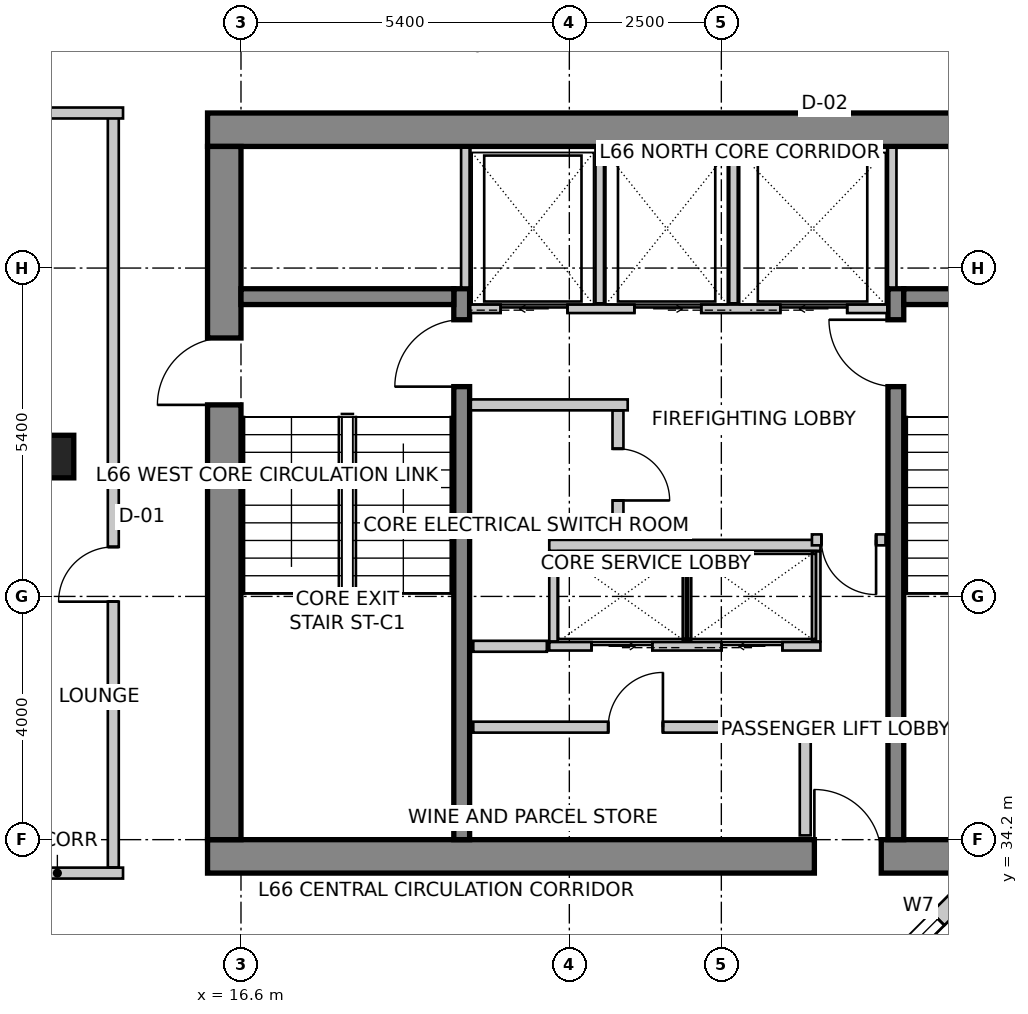
"""IFC4 building model, lengths in metres.
Left out: names, types, materials, properties, quantities, classifications, styles, units other than length and angle.
Written with IfcOpenShell. Run it as: python <this file> out.ifc"""

import sys

from ifc_helpers import new_model, si_unit, direction, frame, frame_2d, origin, origin_2d, place, context, subcontext, project, spatial, rectangle, extrude, source, transform, mapped, element, fill, save


model = new_model("IFC4")
c1 = context("Model", 3, precision=1e-05, world=origin(), true_north=direction((0.0, 1.0)))
c2 = subcontext(c1, "Body", "Model", "MODEL_VIEW")
j1 = project(units=[si_unit("LENGTHUNIT", "METRE"), si_unit("PLANEANGLEUNIT", "RADIAN")], contexts=[c1])
p1 = place(None, origin())
s1 = spatial("IfcSite", under=j1, at=p1, CompositionType="ELEMENT")
p2 = place(p1, origin())
s2 = spatial("IfcBuilding", under=s1, at=p2, CompositionType="ELEMENT")
p3 = place(p2, frame((0.0, 0.0, 260.1)))
s3 = spatial("IfcBuildingStorey", under=s2, at=p3, CompositionType="ELEMENT", Elevation=260.1)
p4 = place(p3, frame((16.05, 45.875, 0.0), z_axis=(0.0, 0.0, 1.0), x_axis=(1.0, 0.0, 0.0)))
e1 = element("IfcWall", 1, at=p4, inside=s3, PredefinedType="SHEAR", context=c2, shape_type="SweptSolid", body=[
    extrude(rectangle(XDim=15.5, YDim=0.55, at=frame_2d((7.75, 0.0))), origin(), (0.0, 0.0, 1.0), 3.6),
])
p5 = place(p3, frame((16.05, 33.925, 0.0), z_axis=(0.0, 0.0, 1.0), x_axis=(1.0, 0.0, 0.0)))
e2 = element("IfcWall", 2, at=p5, inside=s3, PredefinedType="SHEAR", context=c2, shape_type="SweptSolid", body=[
    extrude(rectangle(XDim=15.5, YDim=0.55, at=frame_2d((7.75, 0.0))), origin(), (0.0, 0.0, 1.0), 3.6),
])
m1 = source(origin(), c2, "Body", "SweptSolid", [
    extrude(rectangle(XDim=1.1, YDim=2.15, at=frame_2d((0.55, 1.075))), frame((0.0, 0.285, 0.0), z_axis=(0.0, -1.0, 0.0), x_axis=(1.0, 0.0, 0.0)), (0.0, 0.0, 1.0), 0.57),
])
p6 = place(p5, frame((9.98, 0.0, 0.0)))
e3 = element("IfcOpeningElement", 3, at=p6, cuts=e2, PredefinedType="OPENING", context=c2, shape_type="MappedRepresentation", body=[
    mapped(m1, transform((0.0, 0.0, 0.0), scale=1.0)),
])
p7 = place(p3, frame((16.325, 34.2, 0.0), z_axis=(0.0, 0.0, 1.0), x_axis=(0.0, 1.0, 0.0)))
e4 = element("IfcWall", 4, at=p7, inside=s3, PredefinedType="SHEAR", context=c2, shape_type="SweptSolid", body=[
    extrude(rectangle(XDim=11.4, YDim=0.55, at=frame_2d((5.7, 0.0))), origin(), (0.0, 0.0, 1.0), 3.6),
])
p8 = place(p7, frame((7.15, 0.0, 0.0)))
e5 = element("IfcOpeningElement", 5, at=p8, cuts=e4, PredefinedType="OPENING", context=c2, shape_type="MappedRepresentation", body=[
    mapped(m1, transform((0.0, 0.0, 0.0), scale=1.0)),
])
p9 = place(p3, frame((20.23, 34.2, 0.0), z_axis=(0.0, 0.0, 1.0), x_axis=(0.0, 1.0, 0.0)))
e6 = element("IfcWall", 6, at=p9, inside=s3, PredefinedType="SHEAR", context=c2, shape_type="SweptSolid", body=[
    extrude(rectangle(XDim=9.06, YDim=0.26, at=frame_2d((4.53, 0.0))), origin(), (0.0, 0.0, 1.0), 3.6),
])
m2 = source(origin(), c2, "Body", "SweptSolid", [
    extrude(rectangle(XDim=1.1, YDim=2.15, at=frame_2d((0.55, 1.075))), frame((0.0, 0.14, 0.0), z_axis=(0.0, -1.0, 0.0), x_axis=(1.0, 0.0, 0.0)), (0.0, 0.0, 1.0), 0.28),
])
p10 = place(p9, frame((7.45, 0.0, 0.0)))
e7 = element("IfcOpeningElement", 7, at=p10, cuts=e6, PredefinedType="OPENING", context=c2, shape_type="MappedRepresentation", body=[
    mapped(m2, transform((0.0, 0.0, 0.0), scale=1.0)),
])
p11 = place(p3, frame((27.37, 34.2, 0.0), z_axis=(0.0, 0.0, 1.0), x_axis=(0.0, 1.0, 0.0)))
e8 = element("IfcWall", 8, at=p11, inside=s3, PredefinedType="SHEAR", context=c2, shape_type="SweptSolid", body=[
    extrude(rectangle(XDim=9.06, YDim=0.26, at=frame_2d((4.53, 0.0))), origin(), (0.0, 0.0, 1.0), 3.6),
])
p12 = place(p11, frame((7.45, 0.0, 0.0)))
e9 = element("IfcOpeningElement", 9, at=p12, cuts=e8, PredefinedType="OPENING", context=c2, shape_type="MappedRepresentation", body=[
    mapped(m2, transform((0.0, 0.0, 0.0), scale=1.0)),
])
for number, where, z_axis, x_axis in (
    (10, (16.6, 43.13, 0.0), (0.0, 0.0, 1.0), (1.0, 0.0, 0.0)),
    (11, (27.5, 43.13, 0.0), (0.0, 0.0, 1.0), (1.0, 0.0, 0.0)),
):
    element("IfcWall", number, at=place(p3, frame(where, z_axis=z_axis, x_axis=x_axis)), inside=s3, PredefinedType="SHEAR", context=c2, shape_type="SweptSolid", body=[
        extrude(rectangle(XDim=3.5, YDim=0.26, at=frame_2d((1.75, 0.0))), origin(), (0.0, 0.0, 1.0), 3.6),
    ])
m3 = source(origin(), c2, "Body", "SweptSolid", [
    extrude(rectangle(XDim=0.7, YDim=0.7, at=origin_2d()), origin(), (0.0, 0.0, 1.0), 3.6),
])
p13 = place(p3, frame((13.5, 40.5, 0.0), z_axis=(0.0, 0.0, 1.0), x_axis=(1.0, 0.0, 0.0)))
e12 = element("IfcColumn", 12, at=p13, inside=s3, PredefinedType="COLUMN", context=c2, shape_type="MappedRepresentation", body=[
    mapped(m3, transform((0.0, 0.0, 0.0), scale=1.0)),
])
p14 = place(p3, frame((26.42, 31.256, 0.0), z_axis=(0.0, 0.0, 1.0), x_axis=(0.707106781187, 0.707106781187, 0.0)))
e13 = element("IfcWall", 13, at=p14, inside=s3, PredefinedType="SOLIDWALL", context=c2, shape_type="SweptSolid", body=[
    extrude(rectangle(XDim=2.907, YDim=0.3, at=frame_2d((1.454, 0.0))), origin(), (0.0, 0.0, 1.0), 3.35),
])
m4 = source(origin(), c2, "Body", "SweptSolid", [
    extrude(rectangle(XDim=0.9, YDim=1.6, at=frame_2d((0.45, 0.8))), frame((0.0, 0.16, 0.0), z_axis=(0.0, -1.0, 0.0), x_axis=(1.0, 0.0, 0.0)), (0.0, 0.0, 1.0), 0.32),
])
p15 = place(p14, frame((1.422, 0.0, 0.85)))
e14 = element("IfcOpeningElement", 14, at=p15, cuts=e13, PredefinedType="OPENING", context=c2, shape_type="MappedRepresentation", body=[
    mapped(m4, transform((0.0, 0.0, 0.0), scale=1.0)),
])
p16 = place(p3, frame((21.874, 52.742, 0.0), z_axis=(0.0, 0.0, 1.0), x_axis=(-0.84365659959, -0.536883173482, 0.0)))
e15 = element("IfcWall", 15, at=p16, inside=s3, PredefinedType="SOLIDWALL", context=c2, shape_type="SweptSolid", body=[
    extrude(rectangle(XDim=10.283, YDim=0.3, at=frame_2d((5.142, 0.0))), origin(), (0.0, 0.0, 1.0), 3.35),
])
m5 = source(origin(), c2, "Body", "SweptSolid", [
    extrude(rectangle(XDim=2.1, YDim=2.0, at=frame_2d((1.05, 1.0))), frame((0.0, 0.16, 0.0), z_axis=(0.0, -1.0, 0.0), x_axis=(1.0, 0.0, 0.0)), (0.0, 0.0, 1.0), 0.32),
])
p17 = place(p16, frame((1.41, 0.0, 0.85)))
e16 = element("IfcOpeningElement", 16, at=p17, cuts=e15, PredefinedType="OPENING", context=c2, shape_type="MappedRepresentation", body=[
    mapped(m5, transform((0.0, 0.0, 0.0), scale=1.0)),
])
m6 = source(origin(), c2, "Body", "SweptSolid", [
    extrude(rectangle(XDim=2.4, YDim=2.2, at=frame_2d((1.2, 1.1))), frame((0.0, 0.16, 0.0), z_axis=(0.0, -1.0, 0.0), x_axis=(1.0, 0.0, 0.0)), (0.0, 0.0, 1.0), 0.32),
])
p18 = place(p16, frame((5.54, 0.0, 0.85)))
e17 = element("IfcOpeningElement", 17, at=p18, cuts=e15, PredefinedType="OPENING", context=c2, shape_type="MappedRepresentation", body=[
    mapped(m6, transform((0.0, 0.0, 0.0), scale=1.0)),
])
p19 = place(p3, frame((20.37, 42.93, 0.0), z_axis=(0.0, 0.0, 1.0), x_axis=(1.0, 0.0, 0.0)))
e18 = element("IfcWall", 18, at=p19, inside=s3, PredefinedType="SOLIDWALL", context=c2, shape_type="SweptSolid", body=[
    extrude(rectangle(XDim=6.86, YDim=0.14, at=frame_2d((3.43, 0.0))), origin(), (0.0, 0.0, 1.0), 3.35),
])
m7 = source(origin(), c2, "Body", "SweptSolid", [
    extrude(rectangle(XDim=1.1, YDim=2.15, at=frame_2d((0.55, 1.075))), frame((0.0, 0.08, 0.0), z_axis=(0.0, -1.0, 0.0), x_axis=(1.0, 0.0, 0.0)), (0.0, 0.0, 1.0), 0.16),
])
p20 = place(p19, frame((0.5, 0.0, 0.0)))
e19 = element("IfcOpeningElement", 19, at=p20, cuts=e18, PredefinedType="OPENING", context=c2, shape_type="MappedRepresentation", body=[
    mapped(m7, transform((0.0, 0.0, 0.0), scale=1.0)),
])
p21 = place(p19, frame((2.7, 0.0, 0.0)))
e20 = element("IfcOpeningElement", 20, at=p21, cuts=e18, PredefinedType="OPENING", context=c2, shape_type="MappedRepresentation", body=[
    mapped(m7, transform((0.0, 0.0, 0.0), scale=1.0)),
])
p22 = place(p19, frame((5.1, 0.0, 0.0)))
e21 = element("IfcOpeningElement", 21, at=p22, cuts=e18, PredefinedType="OPENING", context=c2, shape_type="MappedRepresentation", body=[
    mapped(m7, transform((0.0, 0.0, 0.0), scale=1.0)),
])
for number, where, z_axis, x_axis in (
    (22, (20.29, 43.28, 0.0), (0.0, 0.0, 1.0), (0.0, 1.0, 0.0)),
    (23, (27.31, 43.28, 0.0), (0.0, 0.0, 1.0), (0.0, 1.0, 0.0)),
):
    element("IfcWall", number, at=place(p3, frame(where, z_axis=z_axis, x_axis=x_axis)), inside=s3, PredefinedType="SOLIDWALL", context=c2, shape_type="SweptSolid", body=[
        extrude(rectangle(XDim=2.3, YDim=0.14, at=frame_2d((1.15, 0.0))), origin(), (0.0, 0.0, 1.0), 3.35),
    ])
for number, where, z_axis, x_axis in (
    (24, (22.5, 43.02, 0.0), (0.0, 0.0, 1.0), (0.0, 1.0, 0.0)),
    (25, (24.7, 43.02, 0.0), (0.0, 0.0, 1.0), (0.0, 1.0, 0.0)),
):
    element("IfcWall", number, at=place(p3, frame(where, z_axis=z_axis, x_axis=x_axis)), inside=s3, PredefinedType="SOLIDWALL", context=c2, shape_type="SweptSolid", body=[
        extrude(rectangle(XDim=2.56, YDim=0.14, at=frame_2d((1.28, 0.0))), origin(), (0.0, 0.0, 1.0), 3.35),
    ])
p23 = place(p3, frame((21.67, 37.38, 0.0), z_axis=(0.0, 0.0, 1.0), x_axis=(1.0, 0.0, 0.0)))
e26 = element("IfcWall", 26, at=p23, inside=s3, PredefinedType="SOLIDWALL", context=c2, shape_type="SweptSolid", body=[
    extrude(rectangle(XDim=4.46, YDim=0.14, at=frame_2d((2.23, 0.0))), origin(), (0.0, 0.0, 1.0), 3.35),
])
m8 = source(origin(), c2, "Body", "SweptSolid", [
    extrude(rectangle(XDim=1.0, YDim=2.15, at=frame_2d((0.5, 1.075))), frame((0.0, 0.08, 0.0), z_axis=(0.0, -1.0, 0.0), x_axis=(1.0, 0.0, 0.0)), (0.0, 0.0, 1.0), 0.16),
])
p24 = place(p23, frame((0.695, 0.0, 0.0)))
e27 = element("IfcOpeningElement", 27, at=p24, cuts=e26, PredefinedType="OPENING", context=c2, shape_type="MappedRepresentation", body=[
    mapped(m8, transform((0.0, 0.0, 0.0), scale=1.0)),
])
p25 = place(p23, frame((2.835, 0.0, 0.0)))
e28 = element("IfcOpeningElement", 28, at=p25, cuts=e26, PredefinedType="OPENING", context=c2, shape_type="MappedRepresentation", body=[
    mapped(m8, transform((0.0, 0.0, 0.0), scale=1.0)),
])
p26 = place(p3, frame((21.67, 39.04, 0.0), z_axis=(0.0, 0.0, 1.0), x_axis=(1.0, 0.0, 0.0)))
e29 = element("IfcWall", 29, at=p26, inside=s3, PredefinedType="SOLIDWALL", context=c2, shape_type="SweptSolid", body=[
    extrude(rectangle(XDim=4.46, YDim=0.18, at=frame_2d((2.23, 0.0))), origin(), (0.0, 0.0, 1.0), 3.35),
])
for number, where, z_axis, x_axis in (
    (30, (26.06, 37.46, 0.0), (0.0, 0.0, 1.0), (0.0, 1.0, 0.0)),
    (31, (21.74, 37.46, 0.0), (0.0, 0.0, 1.0), (0.0, 1.0, 0.0)),
    (32, (23.935, 37.46, 0.0), (0.0, 0.0, 1.0), (0.0, 1.0, 0.0)),
):
    element("IfcWall", number, at=place(p3, frame(where, z_axis=z_axis, x_axis=x_axis)), inside=s3, PredefinedType="SOLIDWALL", context=c2, shape_type="SweptSolid", body=[
        extrude(rectangle(XDim=1.48, YDim=0.14, at=frame_2d((0.74, 0.0))), origin(), (0.0, 0.0, 1.0), 3.35),
    ])
p27 = place(p3, frame((22.96, 41.35, 0.0), z_axis=(0.0, 0.0, 1.0), x_axis=(-1.0, 0.0, 0.0)))
e33 = element("IfcWall", 33, at=p27, inside=s3, PredefinedType="PARTITIONING", context=c2, shape_type="SweptSolid", body=[
    extrude(rectangle(XDim=2.58, YDim=0.18, at=frame_2d((1.29, 0.0))), origin(), (0.0, 0.0, 1.0), 3.35),
])
p28 = place(p3, frame((22.8, 41.256, 0.0), z_axis=(0.0, 0.0, 1.0), x_axis=(0.0, -1.0, 0.0)))
e34 = element("IfcWall", 34, at=p28, inside=s3, PredefinedType="PARTITIONING", context=c2, shape_type="SweptSolid", body=[
    extrude(rectangle(XDim=2.106, YDim=0.18, at=frame_2d((1.053, 0.0))), origin(), (0.0, 0.0, 1.0), 3.35),
])
m9 = source(origin(), c2, "Body", "SweptSolid", [
    extrude(rectangle(XDim=0.85, YDim=2.15, at=frame_2d((0.425, 1.075))), frame((0.0, 0.1, 0.0), z_axis=(0.0, -1.0, 0.0), x_axis=(1.0, 0.0, 0.0)), (0.0, 0.0, 1.0), 0.2),
])
p29 = place(p28, frame((0.628, 0.0, 0.0)))
e35 = element("IfcOpeningElement", 35, at=p29, cuts=e34, PredefinedType="OPENING", context=c2, shape_type="MappedRepresentation", body=[
    mapped(m9, transform((0.0, 0.0, 0.0), scale=1.0)),
])
p30 = place(p3, frame((21.63, 37.38, 0.0), z_axis=(0.0, 0.0, 1.0), x_axis=(-1.0, 0.0, 0.0)))
e36 = element("IfcWall", 36, at=p30, inside=s3, PredefinedType="PARTITIONING", context=c2, shape_type="SweptSolid", body=[
    extrude(rectangle(XDim=1.21, YDim=0.18, at=frame_2d((0.605, 0.0))), origin(), (0.0, 0.0, 1.0), 3.35),
])
p31 = place(p3, frame((27.2, 39.13, 0.0), z_axis=(0.0, 0.0, 1.0), x_axis=(-1.0, 0.0, 0.0)))
e37 = element("IfcWall", 37, at=p31, inside=s3, PredefinedType="PARTITIONING", context=c2, shape_type="SweptSolid", body=[
    extrude(rectangle(XDim=1.21, YDim=0.18, at=frame_2d((0.605, 0.0))), origin(), (0.0, 0.0, 1.0), 3.35),
])
m10 = source(origin(), c2, "Body", "SweptSolid", [
    extrude(rectangle(XDim=0.9, YDim=2.15, at=frame_2d((0.45, 1.075))), frame((0.0, 0.1, 0.0), z_axis=(0.0, -1.0, 0.0), x_axis=(1.0, 0.0, 0.0)), (0.0, 0.0, 1.0), 0.2),
])
p32 = place(p31, frame((0.155, 0.0, 0.0)))
e38 = element("IfcOpeningElement", 38, at=p32, cuts=e37, PredefinedType="OPENING", context=c2, shape_type="MappedRepresentation", body=[
    mapped(m10, transform((0.0, 0.0, 0.0), scale=1.0)),
])
p33 = place(p3, frame((20.42, 36.05, 0.0), z_axis=(0.0, 0.0, 1.0), x_axis=(1.0, 0.0, 0.0)))
e39 = element("IfcWall", 39, at=p33, inside=s3, PredefinedType="PARTITIONING", context=c2, shape_type="SweptSolid", body=[
    extrude(rectangle(XDim=5.46, YDim=0.18, at=frame_2d((2.73, 0.0))), origin(), (0.0, 0.0, 1.0), 3.35),
])
p34 = place(p33, frame((2.219, 0.0, 0.0)))
e40 = element("IfcOpeningElement", 40, at=p34, cuts=e39, PredefinedType="OPENING", context=c2, shape_type="MappedRepresentation", body=[
    mapped(m10, transform((0.0, 0.0, 0.0), scale=1.0)),
])
p35 = place(p3, frame((25.88, 35.956, 0.0), z_axis=(0.0, 0.0, 1.0), x_axis=(0.0, -1.0, 0.0)))
e41 = element("IfcWall", 41, at=p35, inside=s3, PredefinedType="PARTITIONING", context=c2, shape_type="SweptSolid", body=[
    extrude(rectangle(XDim=1.686, YDim=0.18, at=frame_2d((0.843, 0.0))), origin(), (0.0, 0.0, 1.0), 2.642),
])
p36 = place(p3, frame((12.5, 33.65, 0.0), z_axis=(0.0, 0.0, 1.0), x_axis=(1.0, 0.0, 0.0)))
e42 = element("IfcWall", 42, at=p36, inside=s3, PredefinedType="PARTITIONING", context=c2, shape_type="SweptSolid", body=[
    extrude(rectangle(XDim=2.16, YDim=0.18, at=frame_2d((1.08, 0.0))), origin(), (0.0, 0.0, 1.0), 3.35),
])
p37 = place(p3, frame((14.5, 33.744, 0.0), z_axis=(0.0, 0.0, 1.0), x_axis=(0.0, 1.0, 0.0)))
e43 = element("IfcWall", 43, at=p37, inside=s3, PredefinedType="PARTITIONING", context=c2, shape_type="SweptSolid", body=[
    extrude(rectangle(XDim=12.406, YDim=0.18, at=frame_2d((6.203, 0.0))), origin(), (0.0, 0.0, 1.0), 3.35),
])
p38 = place(p37, frame((4.37, 0.0, 0.0)))
e44 = element("IfcOpeningElement", 44, at=p38, cuts=e43, PredefinedType="OPENING", context=c2, shape_type="MappedRepresentation", body=[
    mapped(m10, transform((0.0, 0.0, 0.0), scale=1.0)),
])
p39 = place(p3, frame((14.66, 46.15, 0.0), z_axis=(0.0, 0.0, 1.0), x_axis=(-1.0, 0.0, 0.0)))
e45 = element("IfcWall", 45, at=p39, inside=s3, PredefinedType="PARTITIONING", context=c2, shape_type="SweptSolid", body=[
    extrude(rectangle(XDim=1.602, YDim=0.18, at=frame_2d((0.801, 0.0))), origin(), (0.0, 0.0, 1.0), 3.35),
])
m11 = source(origin(), c2, "Body", "SweptSolid", [
    extrude(rectangle(XDim=0.9, YDim=1.6, at=frame_2d((0.45, 0.8))), frame((0.0, -0.015, 0.0), z_axis=(0.0, -1.0, 0.0), x_axis=(1.0, 0.0, 0.0)), (0.0, 0.0, 1.0), 0.06),
])
p40 = place(p15, origin())
e46 = element("IfcWindow", 46, at=p40, inside=s3, PartitioningType="SINGLE_PANEL", PredefinedType="WINDOW", context=c2, shape_type="MappedRepresentation", body=[
    mapped(m11, transform((0.0, 0.0, 0.0), scale=1.0)),
])
fill(e14, e46)
m12 = source(origin(), c2, "Body", "SweptSolid", [
    extrude(rectangle(XDim=1.1, YDim=2.15, at=frame_2d((0.55, 1.075))), frame((0.0, 0.025, 0.0), z_axis=(0.0, -1.0, 0.0), x_axis=(1.0, 0.0, 0.0)), (0.0, 0.0, 1.0), 0.05),
])
p41 = place(p20, origin())
e47 = element("IfcDoor", 47, at=p41, inside=s3, OperationType="SLIDING_TO_LEFT", PredefinedType="DOOR", context=c2, shape_type="MappedRepresentation", body=[
    mapped(m12, transform((0.0, 0.0, 0.0), scale=1.0)),
])
fill(e19, e47)
p42 = place(p21, origin())
e48 = element("IfcDoor", 48, at=p42, inside=s3, OperationType="SLIDING_TO_RIGHT", PredefinedType="DOOR", context=c2, shape_type="MappedRepresentation", body=[
    mapped(m12, transform((0.0, 0.0, 0.0), scale=1.0)),
])
fill(e20, e48)
m13 = source(origin(), c2, "Body", "SweptSolid", [
    extrude(rectangle(XDim=1.1, YDim=2.15, at=frame_2d((0.55, 1.075))), frame((0.0, 0.025, 0.0), z_axis=(0.0, -1.0, 0.0), x_axis=(1.0, 0.0, 0.0)), (0.0, 0.0, 1.0), 0.05),
])
p43 = place(p22, origin())
e49 = element("IfcDoor", 49, at=p43, inside=s3, OperationType="SLIDING_TO_LEFT", PredefinedType="DOOR", context=c2, shape_type="MappedRepresentation", body=[
    mapped(m13, transform((0.0, 0.0, 0.0), scale=1.0)),
])
fill(e21, e49)
m14 = source(origin(), c2, "Body", "SweptSolid", [
    extrude(rectangle(XDim=1.0, YDim=2.15, at=frame_2d((0.5, 1.075))), frame((0.0, 0.025, 0.0), z_axis=(0.0, -1.0, 0.0), x_axis=(1.0, 0.0, 0.0)), (0.0, 0.0, 1.0), 0.05),
])
p44 = place(p24, origin())
e50 = element("IfcDoor", 50, at=p44, inside=s3, OperationType="SLIDING_TO_RIGHT", PredefinedType="DOOR", context=c2, shape_type="MappedRepresentation", body=[
    mapped(m14, transform((0.0, 0.0, 0.0), scale=1.0)),
])
fill(e27, e50)
p45 = place(p25, origin())
e51 = element("IfcDoor", 51, at=p45, inside=s3, OperationType="SLIDING_TO_LEFT", PredefinedType="DOOR", context=c2, shape_type="MappedRepresentation", body=[
    mapped(m14, transform((0.0, 0.0, 0.0), scale=1.0)),
])
fill(e28, e51)
m15 = source(origin(), c2, "Body", "SweptSolid", [
    extrude(rectangle(XDim=1.1, YDim=2.15, at=frame_2d((0.55, 1.075))), frame((0.0, 0.025, 0.0), z_axis=(0.0, -1.0, 0.0), x_axis=(1.0, 0.0, 0.0)), (0.0, 0.0, 1.0), 0.05),
])
p46 = place(p10, origin())
e52 = element("IfcDoor", 52, at=p46, inside=s3, OperationType="SINGLE_SWING_LEFT", PredefinedType="DOOR", context=c2, shape_type="MappedRepresentation", body=[
    mapped(m15, transform((0.0, 0.0, 0.0), scale=1.0)),
])
fill(e7, e52)
p47 = place(p12, origin())
e53 = element("IfcDoor", 53, at=p47, inside=s3, OperationType="SINGLE_SWING_RIGHT", PredefinedType="DOOR", context=c2, shape_type="MappedRepresentation", body=[
    mapped(m15, transform((0.0, 0.0, 0.0), scale=1.0)),
])
fill(e9, e53)
p48 = place(p8, origin())
e54 = element("IfcDoor", 54, at=p48, inside=s3, OperationType="SINGLE_SWING_LEFT", PredefinedType="DOOR", context=c2, shape_type="MappedRepresentation", body=[
    mapped(m15, transform((0.0, 0.0, 0.0), scale=1.0)),
])
fill(e5, e54)
p49 = place(p6, origin())
e55 = element("IfcDoor", 55, at=p49, inside=s3, OperationType="SINGLE_SWING_LEFT", PredefinedType="DOOR", context=c2, shape_type="MappedRepresentation", body=[
    mapped(m15, transform((0.0, 0.0, 0.0), scale=1.0)),
])
fill(e3, e55)
m16 = source(origin(), c2, "Body", "SweptSolid", [
    extrude(rectangle(XDim=0.85, YDim=2.15, at=frame_2d((0.425, 1.075))), frame((0.0, 0.025, 0.0), z_axis=(0.0, -1.0, 0.0), x_axis=(1.0, 0.0, 0.0)), (0.0, 0.0, 1.0), 0.05),
])
p50 = place(p29, origin())
e56 = element("IfcDoor", 56, at=p50, inside=s3, OperationType="SINGLE_SWING_RIGHT", PredefinedType="DOOR", context=c2, shape_type="MappedRepresentation", body=[
    mapped(m16, transform((0.0, 0.0, 0.0), scale=1.0)),
])
fill(e35, e56)
m17 = source(origin(), c2, "Body", "SweptSolid", [
    extrude(rectangle(XDim=0.9, YDim=2.15, at=frame_2d((0.45, 1.075))), frame((0.0, 0.025, 0.0), z_axis=(0.0, -1.0, 0.0), x_axis=(1.0, 0.0, 0.0)), (0.0, 0.0, 1.0), 0.05),
])
p51 = place(p32, origin())
e57 = element("IfcDoor", 57, at=p51, inside=s3, OperationType="SINGLE_SWING_LEFT", PredefinedType="DOOR", context=c2, shape_type="MappedRepresentation", body=[
    mapped(m17, transform((0.0, 0.0, 0.0), scale=1.0)),
])
fill(e38, e57)
p52 = place(p34, origin())
e58 = element("IfcDoor", 58, at=p52, inside=s3, OperationType="SINGLE_SWING_RIGHT", PredefinedType="DOOR", context=c2, shape_type="MappedRepresentation", body=[
    mapped(m17, transform((0.0, 0.0, 0.0), scale=1.0)),
])
fill(e40, e58)
m18 = source(origin(), c2, "Body", "SweptSolid", [
    extrude(rectangle(XDim=0.9, YDim=2.15, at=frame_2d((0.45, 1.075))), frame((0.0, 0.025, 0.0), z_axis=(0.0, -1.0, 0.0), x_axis=(1.0, 0.0, 0.0)), (0.0, 0.0, 1.0), 0.05),
])
p53 = place(p38, origin())
e59 = element("IfcDoor", 59, at=p53, inside=s3, OperationType="SINGLE_SWING_LEFT", PredefinedType="DOOR", context=c2, shape_type="MappedRepresentation", body=[
    mapped(m18, transform((0.0, 0.0, 0.0), scale=1.0)),
])
fill(e44, e59)
save(model, sys.argv[1])
